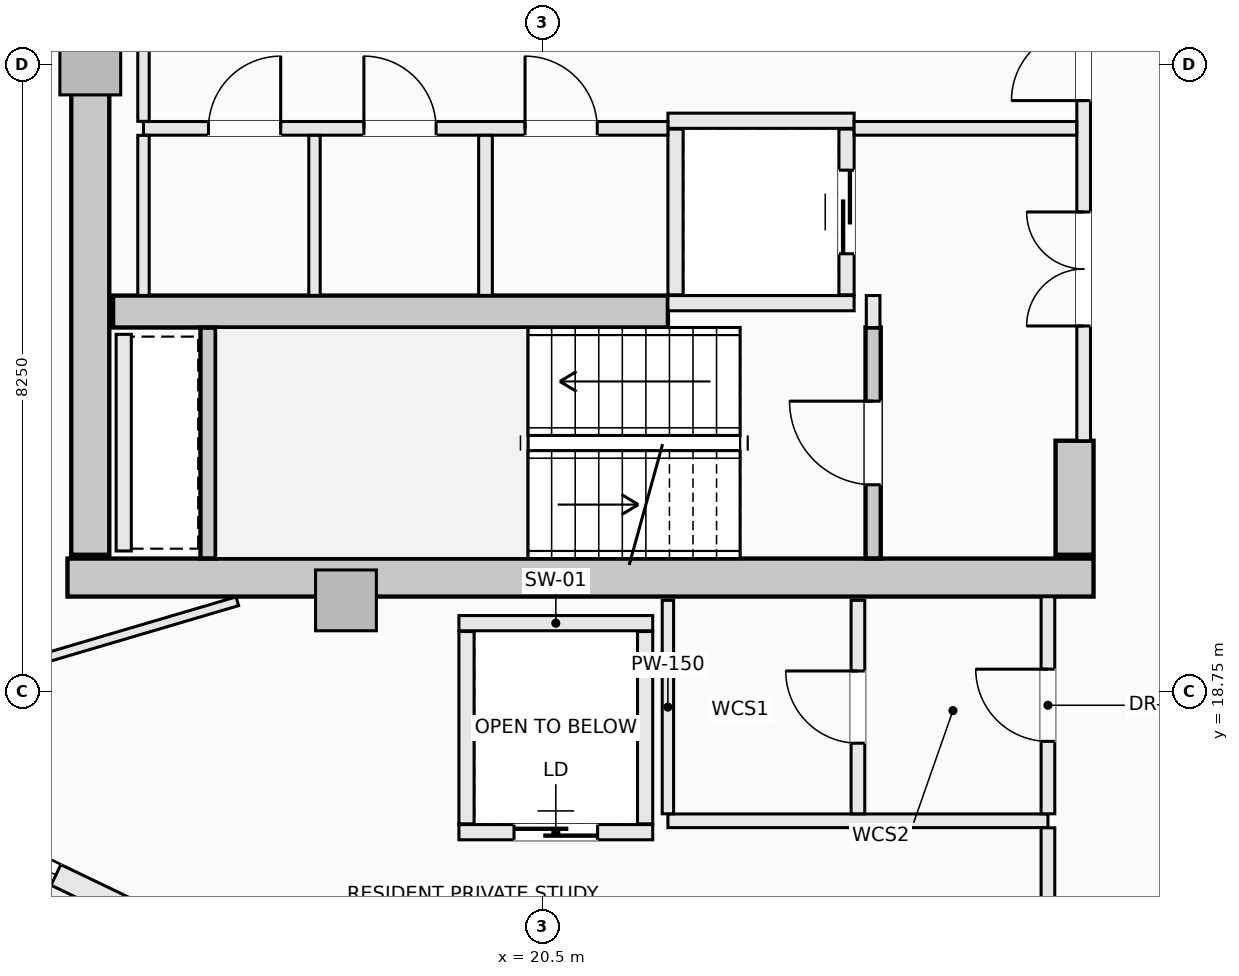
"""IFC4 building model, lengths in metres.
Left out: names, types, materials, properties, quantities, classifications, styles, units other than length and angle.
Written with IfcOpenShell. Run it as: python <this file> out.ifc"""

import sys

from ifc_helpers import new_model, si_unit, direction, frame, frame_2d, origin, origin_2d, place, context, subcontext, project, spatial, rectangle, extrude, element, fill, save


model = new_model("IFC4")
c1 = context("Model", 3, precision=1e-05, world=origin(), true_north=direction((0.0, 1.0)))
c2 = subcontext(c1, "Body", "Model", "MODEL_VIEW")
j1 = project(units=[si_unit("LENGTHUNIT", "METRE"), si_unit("PLANEANGLEUNIT", "RADIAN")], contexts=[c1])
p1 = place(None, origin())
s1 = spatial("IfcSite", under=j1, at=p1, CompositionType="ELEMENT")
p2 = place(p1, origin())
s2 = spatial("IfcBuilding", under=s1, at=p2, CompositionType="ELEMENT")
p3 = place(p2, frame((0.0, 0.0, 245.9)))
s3 = spatial("IfcBuildingStorey", under=s2, at=p3, CompositionType="ELEMENT", Elevation=245.9)
p4 = place(p3, frame((14.25, 20.25, -0.27), z_axis=(0.0, 0.0, 1.0), x_axis=(1.0, 0.0, 0.0)))
e1 = element("IfcWall", 1, at=p4, inside=s3, PredefinedType="SHEAR", context=c2, shape_type="SweptSolid", body=[
    extrude(rectangle(XDim=13.5, YDim=0.5, at=frame_2d((6.75, 0.0))), origin(), (0.0, 0.0, 1.0), 3.3),
])
p5 = place(p3, frame((14.55, 20.55, -0.27), z_axis=(0.0, 0.0, 1.0), x_axis=(0.0, 1.0, 0.0)))
e2 = element("IfcWall", 2, at=p5, inside=s3, PredefinedType="SHEAR", context=c2, shape_type="SweptSolid", body=[
    extrude(rectangle(XDim=12.9, YDim=0.5, at=frame_2d((6.45, 0.0))), origin(), (0.0, 0.0, 1.0), 3.3),
])
p6 = place(p3, frame((27.5, 20.55, -0.27), z_axis=(0.0, 0.0, 1.0), x_axis=(0.0, 1.0, 0.0)))
e3 = element("IfcWall", 3, at=p6, inside=s3, PredefinedType="SHEAR", context=c2, shape_type="SweptSolid", body=[
    extrude(rectangle(XDim=1.5, YDim=0.5, at=frame_2d((0.75, 0.0))), origin(), (0.0, 0.0, 1.0), 3.3),
])
p7 = place(p3, frame((14.85, 23.75, -0.27), z_axis=(0.0, 0.0, 1.0), x_axis=(1.0, 0.0, 0.0)))
e4 = element("IfcWall", 4, at=p7, inside=s3, PredefinedType="SHEAR", context=c2, shape_type="SweptSolid", body=[
    extrude(rectangle(XDim=7.3, YDim=0.42, at=frame_2d((3.65, 0.0))), origin(), (0.0, 0.0, 1.0), 3.3),
])
for number, where, z_axis, x_axis in (
    (5, (14.55, 27.0, -0.27), (0.0, 0.0, 1.0), (1.0, 0.0, 0.0)),
    (6, (17.914, 19.95, -0.27), (0.0, 0.0, 1.0), (1.0, 0.0, 0.0)),
):
    element("IfcColumn", number, at=place(p3, frame(where, z_axis=z_axis, x_axis=x_axis)), inside=s3, PredefinedType="PILASTER", context=c2, shape_type="SweptSolid", body=[
        extrude(rectangle(XDim=0.8, YDim=0.8, at=origin_2d()), origin(), (0.0, 0.0, 1.0), 3.3),
    ])
p8 = place(p3, frame((10.639, 18.0, 0.0), z_axis=(0.0, 0.0, 1.0), x_axis=(0.901355238351, -0.433080517106, 0.0)))
e7 = element("IfcWall", 7, at=p8, inside=s3, PredefinedType="SOLIDWALL", context=c2, shape_type="SweptSolid", body=[
    extrude(rectangle(XDim=5.473, YDim=0.3, at=frame_2d((2.737, 0.0))), origin(), (0.0, 0.0, 1.0), 2.605),
])
p9 = place(p8, frame((1.637, 0.0, 0.72)))
e8 = element("IfcOpeningElement", 8, at=p9, cuts=e7, PredefinedType="OPENING", context=c2, shape_type="SweptSolid", body=[
    extrude(rectangle(XDim=2.2, YDim=1.65, at=frame_2d((1.1, 0.825))), frame((0.0, 0.16, 0.0), z_axis=(0.0, -1.0, 0.0), x_axis=(1.0, 0.0, 0.0)), (0.0, 0.0, 1.0), 0.32),
])
p10 = place(p3, frame((24.85, 20.502, -0.27), z_axis=(0.0, 0.0, 1.0), x_axis=(0.0, 1.0, 0.0)))
e9 = element("IfcWall", 9, at=p10, inside=s3, PredefinedType="SHEAR", context=c2, shape_type="SweptSolid", body=[
    extrude(rectangle(XDim=3.038, YDim=0.2, at=frame_2d((1.519, 0.0))), origin(), (0.0, 0.0, 1.0), 3.3),
])
p11 = place(p10, frame((0.969, 0.0, 0.27)))
e10 = element("IfcOpeningElement", 10, at=p11, cuts=e9, PredefinedType="OPENING", context=c2, shape_type="SweptSolid", body=[
    extrude(rectangle(XDim=1.1, YDim=2.15, at=frame_2d((0.55, 1.075))), frame((0.0, 0.11, 0.0), z_axis=(0.0, -1.0, 0.0), x_axis=(1.0, 0.0, 0.0)), (0.0, 0.0, 1.0), 0.22),
])
p12 = place(p3, frame((16.1, 20.502, -0.27), z_axis=(0.0, 0.0, 1.0), x_axis=(0.0, 1.0, 0.0)))
e11 = element("IfcWall", 11, at=p12, inside=s3, PredefinedType="SHEAR", context=c2, shape_type="SweptSolid", body=[
    extrude(rectangle(XDim=3.036, YDim=0.2, at=frame_2d((1.518, 0.0))), origin(), (0.0, 0.0, 1.0), 3.3),
])
for number, where, z_axis, x_axis in (
    (12, (22.15, 26.26, 0.0), (0.0, 0.0, 1.0), (1.0, 0.0, 0.0)),
    (13, (22.15, 23.86, 0.0), (0.0, 0.0, 1.0), (1.0, 0.0, 0.0)),
):
    element("IfcWall", number, at=place(p3, frame(where, z_axis=z_axis, x_axis=x_axis)), inside=s3, PredefinedType="SOLIDWALL", context=c2, shape_type="SweptSolid", body=[
        extrude(rectangle(XDim=2.45, YDim=0.2, at=frame_2d((1.225, 0.0))), origin(), (0.0, 0.0, 1.0), 3.03),
    ])
p13 = place(p3, frame((22.25, 23.97, 0.0), z_axis=(0.0, 0.0, 1.0), x_axis=(0.0, 1.0, 0.0)))
e14 = element("IfcWall", 14, at=p13, inside=s3, PredefinedType="SOLIDWALL", context=c2, shape_type="SweptSolid", body=[
    extrude(rectangle(XDim=2.18, YDim=0.2, at=frame_2d((1.09, 0.0))), origin(), (0.0, 0.0, 1.0), 3.03),
])
p14 = place(p3, frame((24.5, 23.97, 0.0), z_axis=(0.0, 0.0, 1.0), x_axis=(0.0, 1.0, 0.0)))
e15 = element("IfcWall", 15, at=p14, inside=s3, PredefinedType="SOLIDWALL", context=c2, shape_type="SweptSolid", body=[
    extrude(rectangle(XDim=2.18, YDim=0.2, at=frame_2d((1.09, 0.0))), origin(), (0.0, 0.0, 1.0), 3.03),
])
p15 = place(p14, frame((0.54, 0.0, 0.0)))
e16 = element("IfcOpeningElement", 16, at=p15, cuts=e15, PredefinedType="OPENING", context=c2, shape_type="SweptSolid", body=[
    extrude(rectangle(XDim=1.1, YDim=2.2, at=frame_2d((0.55, 1.1))), frame((0.0, 0.11, 0.0), z_axis=(0.0, -1.0, 0.0), x_axis=(1.0, 0.0, 0.0)), (0.0, 0.0, 1.0), 0.22),
])
p16 = place(p3, frame((19.4, 19.65, 0.0), z_axis=(0.0, 0.0, 1.0), x_axis=(1.0, 0.0, 0.0)))
e17 = element("IfcWall", 17, at=p16, inside=s3, PredefinedType="SOLIDWALL", context=c2, shape_type="SweptSolid", body=[
    extrude(rectangle(XDim=2.55, YDim=0.2, at=frame_2d((1.275, 0.0))), origin(), (0.0, 0.0, 1.0), 3.03),
])
p17 = place(p3, frame((19.4, 16.9, 0.0), z_axis=(0.0, 0.0, 1.0), x_axis=(1.0, 0.0, 0.0)))
e18 = element("IfcWall", 18, at=p17, inside=s3, PredefinedType="SOLIDWALL", context=c2, shape_type="SweptSolid", body=[
    extrude(rectangle(XDim=2.55, YDim=0.2, at=frame_2d((1.275, 0.0))), origin(), (0.0, 0.0, 1.0), 3.03),
])
p18 = place(p17, frame((0.725, 0.0, 0.0)))
e19 = element("IfcOpeningElement", 19, at=p18, cuts=e18, PredefinedType="OPENING", context=c2, shape_type="SweptSolid", body=[
    extrude(rectangle(XDim=1.1, YDim=2.2, at=frame_2d((0.55, 1.1))), frame((0.0, 0.11, 0.0), z_axis=(0.0, -1.0, 0.0), x_axis=(1.0, 0.0, 0.0)), (0.0, 0.0, 1.0), 0.22),
])
for number, where, z_axis, x_axis in (
    (20, (19.5, 17.01, 0.0), (0.0, 0.0, 1.0), (0.0, 1.0, 0.0)),
    (21, (21.85, 17.01, 0.0), (0.0, 0.0, 1.0), (0.0, 1.0, 0.0)),
):
    element("IfcWall", number, at=place(p3, frame(where, z_axis=z_axis, x_axis=x_axis)), inside=s3, PredefinedType="SOLIDWALL", context=c2, shape_type="SweptSolid", body=[
        extrude(rectangle(XDim=2.53, YDim=0.2, at=frame_2d((1.265, 0.0))), origin(), (0.0, 0.0, 1.0), 3.03),
    ])
p19 = place(p3, frame((14.99, 20.6, 0.0), z_axis=(0.0, 0.0, 1.0), x_axis=(0.0, 1.0, 0.0)))
e22 = element("IfcWall", 22, at=p19, inside=s3, PredefinedType="SOLIDWALL", context=c2, shape_type="SweptSolid", body=[
    extrude(rectangle(XDim=2.85, YDim=0.2, at=frame_2d((1.425, 0.0))), origin(), (0.0, 0.0, 1.0), 3.03),
])
p20 = place(p3, frame((24.85, 23.54, 0.0), z_axis=(0.0, 0.0, 1.0), x_axis=(0.0, 1.0, 0.0)))
e23 = element("IfcWall", 23, at=p20, inside=s3, PredefinedType="SOLIDWALL", context=c2, shape_type="SweptSolid", body=[
    extrude(rectangle(XDim=0.42, YDim=0.18, at=frame_2d((0.21, 0.0))), origin(), (0.0, 0.0, 1.0), 3.03),
])
p21 = place(p3, frame((27.62, 22.05, 0.0), z_axis=(0.0, 0.0, 1.0), x_axis=(0.0, 1.0, 0.0)))
e24 = element("IfcWall", 24, at=p21, inside=s3, PredefinedType="SOLIDWALL", context=c2, shape_type="SweptSolid", body=[
    extrude(rectangle(XDim=9.9, YDim=0.18, at=frame_2d((4.95, 0.0))), origin(), (0.0, 0.0, 1.0), 3.03),
])
p22 = place(p21, frame((4.475, 0.0, 0.0)))
e25 = element("IfcOpeningElement", 25, at=p22, cuts=e24, PredefinedType="OPENING", context=c2, shape_type="SweptSolid", body=[
    extrude(rectangle(XDim=0.95, YDim=2.1, at=frame_2d((0.475, 1.05))), frame((0.0, 0.1, 0.0), z_axis=(0.0, -1.0, 0.0), x_axis=(1.0, 0.0, 0.0)), (0.0, 0.0, 1.0), 0.2),
])
p23 = place(p21, frame((6.89, 0.0, 0.0)))
e26 = element("IfcOpeningElement", 26, at=p23, cuts=e24, PredefinedType="OPENING", context=c2, shape_type="SweptSolid", body=[
    extrude(rectangle(XDim=1.5, YDim=2.2, at=frame_2d((0.75, 1.1))), frame((0.0, 0.1, 0.0), z_axis=(0.0, -1.0, 0.0), x_axis=(1.0, 0.0, 0.0)), (0.0, 0.0, 1.0), 0.2),
])
p24 = place(p21, frame((1.51, 0.0, 0.0)))
e27 = element("IfcOpeningElement", 27, at=p24, cuts=e24, PredefinedType="OPENING", context=c2, shape_type="SweptSolid", body=[
    extrude(rectangle(XDim=1.5, YDim=2.2, at=frame_2d((0.75, 1.1))), frame((0.0, 0.1, 0.0), z_axis=(0.0, -1.0, 0.0), x_axis=(1.0, 0.0, 0.0)), (0.0, 0.0, 1.0), 0.2),
])
p25 = place(p3, frame((15.25, 26.16, 0.0), z_axis=(0.0, 0.0, 1.0), x_axis=(1.0, 0.0, 0.0)))
e28 = element("IfcWall", 28, at=p25, inside=s3, PredefinedType="SOLIDWALL", context=c2, shape_type="SweptSolid", body=[
    extrude(rectangle(XDim=6.9, YDim=0.18, at=frame_2d((3.45, 0.0))), origin(), (0.0, 0.0, 1.0), 3.03),
])
p26 = place(p25, frame((5.02, 0.0, 0.0)))
e29 = element("IfcOpeningElement", 29, at=p26, cuts=e28, PredefinedType="OPENING", context=c2, shape_type="SweptSolid", body=[
    extrude(rectangle(XDim=0.95, YDim=2.1, at=frame_2d((0.475, 1.05))), frame((0.0, 0.1, 0.0), z_axis=(0.0, -1.0, 0.0), x_axis=(1.0, 0.0, 0.0)), (0.0, 0.0, 1.0), 0.2),
])
p27 = place(p25, frame((0.855, 0.0, 0.0)))
e30 = element("IfcOpeningElement", 30, at=p27, cuts=e28, PredefinedType="OPENING", context=c2, shape_type="SweptSolid", body=[
    extrude(rectangle(XDim=0.95, YDim=2.1, at=frame_2d((0.475, 1.05))), frame((0.0, 0.1, 0.0), z_axis=(0.0, -1.0, 0.0), x_axis=(1.0, 0.0, 0.0)), (0.0, 0.0, 1.0), 0.2),
])
p28 = place(p25, frame((2.9, 0.0, 0.0)))
e31 = element("IfcOpeningElement", 31, at=p28, cuts=e28, PredefinedType="OPENING", context=c2, shape_type="SweptSolid", body=[
    extrude(rectangle(XDim=0.95, YDim=2.1, at=frame_2d((0.475, 1.05))), frame((0.0, 0.1, 0.0), z_axis=(0.0, -1.0, 0.0), x_axis=(1.0, 0.0, 0.0)), (0.0, 0.0, 1.0), 0.2),
])
p29 = place(p3, frame((24.6, 26.16, 0.0), z_axis=(0.0, 0.0, 1.0), x_axis=(1.0, 0.0, 0.0)))
e32 = element("IfcWall", 32, at=p29, inside=s3, PredefinedType="SOLIDWALL", context=c2, shape_type="SweptSolid", body=[
    extrude(rectangle(XDim=2.928, YDim=0.18, at=frame_2d((1.464, 0.0))), origin(), (0.0, 0.0, 1.0), 3.03),
])
p30 = place(p3, frame((15.25, 23.962, 0.0), z_axis=(0.0, 0.0, 1.0), x_axis=(0.0, 1.0, 0.0)))
e33 = element("IfcWall", 33, at=p30, inside=s3, PredefinedType="PARTITIONING", context=c2, shape_type="SweptSolid", body=[
    extrude(rectangle(XDim=2.106, YDim=0.15, at=frame_2d((1.053, 0.0))), origin(), (0.0, 0.0, 1.0), 3.03),
])
p31 = place(p3, frame((15.25, 26.252, 0.0), z_axis=(0.0, 0.0, 1.0), x_axis=(0.0, 1.0, 0.0)))
e34 = element("IfcWall", 34, at=p31, inside=s3, PredefinedType="PARTITIONING", context=c2, shape_type="SweptSolid", body=[
    extrude(rectangle(XDim=1.496, YDim=0.15, at=frame_2d((0.748, 0.0))), origin(), (0.0, 0.0, 1.0), 3.03),
])
p32 = place(p3, frame((19.75, 23.962, 0.0), z_axis=(0.0, 0.0, 1.0), x_axis=(0.0, 1.0, 0.0)))
e35 = element("IfcWall", 35, at=p32, inside=s3, PredefinedType="SOLIDWALL", context=c2, shape_type="SweptSolid", body=[
    extrude(rectangle(XDim=2.106, YDim=0.18, at=frame_2d((1.053, 0.0))), origin(), (0.0, 0.0, 1.0), 3.03),
])
p33 = place(p3, frame((17.5, 23.962, 0.0), z_axis=(0.0, 0.0, 1.0), x_axis=(0.0, 1.0, 0.0)))
e36 = element("IfcWall", 36, at=p33, inside=s3, PredefinedType="PARTITIONING", context=c2, shape_type="SweptSolid", body=[
    extrude(rectangle(XDim=2.106, YDim=0.15, at=frame_2d((1.053, 0.0))), origin(), (0.0, 0.0, 1.0), 3.03),
])
p34 = place(p3, frame((22.15, 17.05, 0.0), z_axis=(0.0, 0.0, 1.0), x_axis=(1.0, 0.0, 0.0)))
e37 = element("IfcWall", 37, at=p34, inside=s3, PredefinedType="SOLIDWALL", context=c2, shape_type="SweptSolid", body=[
    extrude(rectangle(XDim=5.0, YDim=0.18, at=frame_2d((2.5, 0.0))), origin(), (0.0, 0.0, 1.0), 3.03),
])
p35 = place(p3, frame((22.15, 17.142, 0.0), z_axis=(0.0, 0.0, 1.0), x_axis=(0.0, 1.0, 0.0)))
e38 = element("IfcWall", 38, at=p35, inside=s3, PredefinedType="PARTITIONING", context=c2, shape_type="SweptSolid", body=[
    extrude(rectangle(XDim=2.808, YDim=0.15, at=frame_2d((1.404, 0.0))), origin(), (0.0, 0.0, 1.0), 3.03),
])
p36 = place(p3, frame((24.65, 17.142, 0.0), z_axis=(0.0, 0.0, 1.0), x_axis=(0.0, 1.0, 0.0)))
e39 = element("IfcWall", 39, at=p36, inside=s3, PredefinedType="SOLIDWALL", context=c2, shape_type="SweptSolid", body=[
    extrude(rectangle(XDim=2.808, YDim=0.18, at=frame_2d((1.404, 0.0))), origin(), (0.0, 0.0, 1.0), 3.03),
])
p37 = place(p36, frame((0.929, 0.0, 0.0)))
e40 = element("IfcOpeningElement", 40, at=p37, cuts=e39, PredefinedType="OPENING", context=c2, shape_type="SweptSolid", body=[
    extrude(rectangle(XDim=0.95, YDim=2.1, at=frame_2d((0.475, 1.05))), frame((0.0, 0.1, 0.0), z_axis=(0.0, -1.0, 0.0), x_axis=(1.0, 0.0, 0.0)), (0.0, 0.0, 1.0), 0.2),
])
p38 = place(p3, frame((27.15, 11.75, 0.0), z_axis=(0.0, 0.0, 1.0), x_axis=(0.0, 1.0, 0.0)))
e41 = element("IfcWall", 41, at=p38, inside=s3, PredefinedType="SOLIDWALL", context=c2, shape_type="SweptSolid", body=[
    extrude(rectangle(XDim=5.208, YDim=0.18, at=frame_2d((2.604, 0.0))), origin(), (0.0, 0.0, 1.0), 3.03),
])
p39 = place(p38, frame((3.269, 0.0, 0.0)))
e42 = element("IfcOpeningElement", 42, at=p39, cuts=e41, PredefinedType="OPENING", context=c2, shape_type="SweptSolid", body=[
    extrude(rectangle(XDim=0.95, YDim=2.1, at=frame_2d((0.475, 1.05))), frame((0.0, 0.1, 0.0), z_axis=(0.0, -1.0, 0.0), x_axis=(1.0, 0.0, 0.0)), (0.0, 0.0, 1.0), 0.2),
])
p40 = place(p38, frame((1.077, 0.0, 0.0)))
e43 = element("IfcOpeningElement", 43, at=p40, cuts=e41, PredefinedType="OPENING", context=c2, shape_type="SweptSolid", body=[
    extrude(rectangle(XDim=0.95, YDim=2.1, at=frame_2d((0.475, 1.05))), frame((0.0, 0.1, 0.0), z_axis=(0.0, -1.0, 0.0), x_axis=(1.0, 0.0, 0.0)), (0.0, 0.0, 1.0), 0.2),
])
p41 = place(p3, frame((27.15, 17.142, 0.0), z_axis=(0.0, 0.0, 1.0), x_axis=(0.0, 1.0, 0.0)))
e44 = element("IfcWall", 44, at=p41, inside=s3, PredefinedType="SOLIDWALL", context=c2, shape_type="SweptSolid", body=[
    extrude(rectangle(XDim=2.856, YDim=0.18, at=frame_2d((1.428, 0.0))), origin(), (0.0, 0.0, 1.0), 3.03),
])
p42 = place(p41, frame((0.953, 0.0, 0.0)))
e45 = element("IfcOpeningElement", 45, at=p42, cuts=e44, PredefinedType="OPENING", context=c2, shape_type="SweptSolid", body=[
    extrude(rectangle(XDim=0.95, YDim=2.1, at=frame_2d((0.475, 1.05))), frame((0.0, 0.1, 0.0), z_axis=(0.0, -1.0, 0.0), x_axis=(1.0, 0.0, 0.0)), (0.0, 0.0, 1.0), 0.2),
])
p43 = place(p3, frame((10.692, 18.23, 0.0), z_axis=(0.0, 0.0, 1.0), x_axis=(0.959163130609, 0.282853475992, 0.0)))
e46 = element("IfcWall", 46, at=p43, inside=s3, PredefinedType="PARTITIONING", context=c2, shape_type="SweptSolid", body=[
    extrude(rectangle(XDim=6.039, YDim=0.12, at=frame_2d((3.02, 0.0))), origin(), (0.0, 0.0, 1.0), 2.77),
])
p44 = place(p9, origin())
e47 = element("IfcWindow", 47, at=p44, inside=s3, PartitioningType="SINGLE_PANEL", PredefinedType="WINDOW", context=c2, shape_type="SweptSolid", body=[
    extrude(rectangle(XDim=2.2, YDim=1.65, at=frame_2d((1.1, 0.825))), frame((0.0, 0.03, 0.0), z_axis=(0.0, -1.0, 0.0), x_axis=(1.0, 0.0, 0.0)), (0.0, 0.0, 1.0), 0.06),
])
fill(e8, e47)
p45 = place(p11, origin())
e48 = element("IfcDoor", 48, at=p45, inside=s3, OperationType="SINGLE_SWING_RIGHT", PredefinedType="DOOR", context=c2, shape_type="SweptSolid", body=[
    extrude(rectangle(XDim=1.1, YDim=2.15, at=frame_2d((0.55, 1.075))), frame((0.0, 0.025, 0.0), z_axis=(0.0, -1.0, 0.0), x_axis=(1.0, 0.0, 0.0)), (0.0, 0.0, 1.0), 0.05),
])
fill(e10, e48)
p46 = place(p15, origin())
e49 = element("IfcDoor", 49, at=p46, inside=s3, OperationType="SLIDING_TO_LEFT", PredefinedType="DOOR", context=c2, shape_type="SweptSolid", body=[
    extrude(rectangle(XDim=1.1, YDim=2.2, at=frame_2d((0.55, 1.1))), frame((0.0, 0.025, 0.0), z_axis=(0.0, -1.0, 0.0), x_axis=(1.0, 0.0, 0.0)), (0.0, 0.0, 1.0), 0.05),
])
fill(e16, e49)
p47 = place(p18, origin())
e50 = element("IfcDoor", 50, at=p47, inside=s3, OperationType="SLIDING_TO_LEFT", PredefinedType="DOOR", context=c2, shape_type="SweptSolid", body=[
    extrude(rectangle(XDim=1.1, YDim=2.2, at=frame_2d((0.55, 1.1))), frame((0.0, 0.025, 0.0), z_axis=(0.0, -1.0, 0.0), x_axis=(1.0, 0.0, 0.0)), (0.0, 0.0, 1.0), 0.05),
])
fill(e19, e50)
p48 = place(p22, origin())
e51 = element("IfcDoor", 51, at=p48, inside=s3, OperationType="SINGLE_SWING_LEFT", PredefinedType="DOOR", context=c2, shape_type="SweptSolid", body=[
    extrude(rectangle(XDim=0.95, YDim=2.1, at=frame_2d((0.475, 1.05))), frame((0.0, 0.025, 0.0), z_axis=(0.0, -1.0, 0.0), x_axis=(1.0, 0.0, 0.0)), (0.0, 0.0, 1.0), 0.05),
])
fill(e25, e51)
p49 = place(p24, origin())
e52 = element("IfcDoor", 52, at=p49, inside=s3, OperationType="DOUBLE_DOOR_SINGLE_SWING", PredefinedType="DOOR", context=c2, shape_type="SweptSolid", body=[
    extrude(rectangle(XDim=1.5, YDim=2.2, at=frame_2d((0.75, 1.1))), frame((0.0, 0.025, 0.0), z_axis=(0.0, -1.0, 0.0), x_axis=(1.0, 0.0, 0.0)), (0.0, 0.0, 1.0), 0.05),
])
fill(e27, e52)
p50 = place(p26, origin())
e53 = element("IfcDoor", 53, at=p50, inside=s3, OperationType="SINGLE_SWING_LEFT", PredefinedType="DOOR", context=c2, shape_type="SweptSolid", body=[
    extrude(rectangle(XDim=0.95, YDim=2.1, at=frame_2d((0.475, 1.05))), frame((0.0, 0.025, 0.0), z_axis=(0.0, -1.0, 0.0), x_axis=(1.0, 0.0, 0.0)), (0.0, 0.0, 1.0), 0.05),
])
fill(e29, e53)
p51 = place(p27, origin())
e54 = element("IfcDoor", 54, at=p51, inside=s3, OperationType="SINGLE_SWING_RIGHT", PredefinedType="DOOR", context=c2, shape_type="SweptSolid", body=[
    extrude(rectangle(XDim=0.95, YDim=2.1, at=frame_2d((0.475, 1.05))), frame((0.0, 0.025, 0.0), z_axis=(0.0, -1.0, 0.0), x_axis=(1.0, 0.0, 0.0)), (0.0, 0.0, 1.0), 0.05),
])
fill(e30, e54)
p52 = place(p28, origin())
e55 = element("IfcDoor", 55, at=p52, inside=s3, OperationType="SINGLE_SWING_LEFT", PredefinedType="DOOR", context=c2, shape_type="SweptSolid", body=[
    extrude(rectangle(XDim=0.95, YDim=2.1, at=frame_2d((0.475, 1.05))), frame((0.0, 0.025, 0.0), z_axis=(0.0, -1.0, 0.0), x_axis=(1.0, 0.0, 0.0)), (0.0, 0.0, 1.0), 0.05),
])
fill(e31, e55)
p53 = place(p42, origin())
e56 = element("IfcDoor", 56, at=p53, inside=s3, OperationType="SINGLE_SWING_RIGHT", PredefinedType="DOOR", context=c2, shape_type="SweptSolid", body=[
    extrude(rectangle(XDim=0.95, YDim=2.1, at=frame_2d((0.475, 1.05))), frame((0.0, 0.025, 0.0), z_axis=(0.0, -1.0, 0.0), x_axis=(1.0, 0.0, 0.0)), (0.0, 0.0, 1.0), 0.05),
])
fill(e45, e56)
p54 = place(p37, origin())
e57 = element("IfcDoor", 57, at=p54, inside=s3, OperationType="SINGLE_SWING_RIGHT", PredefinedType="DOOR", context=c2, shape_type="SweptSolid", body=[
    extrude(rectangle(XDim=0.95, YDim=2.1, at=frame_2d((0.475, 1.05))), frame((0.0, 0.025, 0.0), z_axis=(0.0, -1.0, 0.0), x_axis=(1.0, 0.0, 0.0)), (0.0, 0.0, 1.0), 0.05),
])
fill(e40, e57)
save(model, sys.argv[1])
